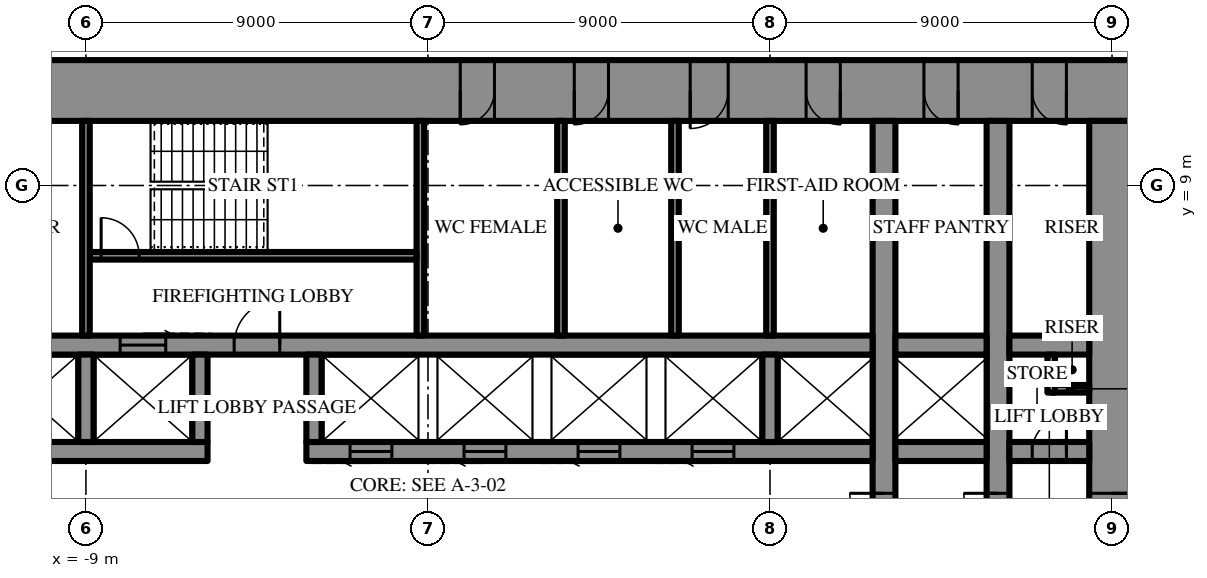
"""IFC4 building model, lengths in metres.
Left out: names, types, materials, properties, quantities, classifications, styles, units other than length and angle.
Written with IfcOpenShell. Run it as: python <this file> out.ifc"""

import sys

from ifc_helpers import new_model, si_unit, direction, frame, frame_2d, origin, place, context, subcontext, project, spatial, rectangle, extrude, element, fill, save


model = new_model("IFC4")
c1 = context("Model", 3, precision=1e-05, world=origin(), true_north=direction((0.0, 1.0)))
c2 = subcontext(c1, "Body", "Model", "MODEL_VIEW")
j1 = project(units=[si_unit("LENGTHUNIT", "METRE"), si_unit("PLANEANGLEUNIT", "RADIAN")], contexts=[c1])
p1 = place(None, origin())
s1 = spatial("IfcSite", under=j1, at=p1, CompositionType="ELEMENT")
p2 = place(p1, origin())
s2 = spatial("IfcBuilding", under=s1, at=p2, CompositionType="ELEMENT")
p3 = place(p2, frame((0.0, 0.0, 178.3)))
s3 = spatial("IfcBuildingStorey", under=s2, at=p3, CompositionType="ELEMENT", Elevation=178.3)
p4 = place(p3, frame((-18.6, 11.5, 0.0), z_axis=(0.0, 0.0, 1.0), x_axis=(1.0, 0.0, 0.0)))
e1 = element("IfcWall", 1, at=p4, inside=s3, PredefinedType="SHEAR", context=c2, shape_type="SweptSolid", body=[
    extrude(rectangle(XDim=37.2, YDim=1.6, at=frame_2d((18.6, 0.0))), origin(), (0.0, 0.0, 1.0), 4.2),
])
p5 = place(p4, frame((19.45, 0.0, 0.0)))
e2 = element("IfcOpeningElement", 2, at=p5, cuts=e1, PredefinedType="OPENING", context=c2, shape_type="SweptSolid", body=[
    extrude(rectangle(XDim=0.9, YDim=2.2, at=frame_2d((0.45, 1.1))), frame((0.0, 0.81, 0.0), z_axis=(0.0, -1.0, 0.0), x_axis=(1.0, 0.0, 0.0)), (0.0, 0.0, 1.0), 1.62),
])
p6 = place(p4, frame((22.45, 0.0, 0.0)))
e3 = element("IfcOpeningElement", 3, at=p6, cuts=e1, PredefinedType="OPENING", context=c2, shape_type="SweptSolid", body=[
    extrude(rectangle(XDim=0.9, YDim=2.2, at=frame_2d((0.45, 1.1))), frame((0.0, 0.81, 0.0), z_axis=(0.0, -1.0, 0.0), x_axis=(1.0, 0.0, 0.0)), (0.0, 0.0, 1.0), 1.62),
])
p7 = place(p4, frame((25.5, 0.0, 0.0)))
e4 = element("IfcOpeningElement", 4, at=p7, cuts=e1, PredefinedType="OPENING", context=c2, shape_type="SweptSolid", body=[
    extrude(rectangle(XDim=1.0, YDim=2.2, at=frame_2d((0.5, 1.1))), frame((0.0, 0.81, 0.0), z_axis=(0.0, -1.0, 0.0), x_axis=(1.0, 0.0, 0.0)), (0.0, 0.0, 1.0), 1.62),
])
p8 = place(p4, frame((1.8, 0.0, 0.0)))
e5 = element("IfcOpeningElement", 5, at=p8, cuts=e1, PredefinedType="OPENING", context=c2, shape_type="SweptSolid", body=[
    extrude(rectangle(XDim=0.9, YDim=2.2, at=frame_2d((0.45, 1.1))), frame((0.0, 0.81, 0.0), z_axis=(0.0, -1.0, 0.0), x_axis=(1.0, 0.0, 0.0)), (0.0, 0.0, 1.0), 1.62),
])
p9 = place(p4, frame((4.65, 0.0, 0.0)))
e6 = element("IfcOpeningElement", 6, at=p9, cuts=e1, PredefinedType="OPENING", context=c2, shape_type="SweptSolid", body=[
    extrude(rectangle(XDim=0.9, YDim=2.2, at=frame_2d((0.45, 1.1))), frame((0.0, 0.81, 0.0), z_axis=(0.0, -1.0, 0.0), x_axis=(1.0, 0.0, 0.0)), (0.0, 0.0, 1.0), 1.62),
])
p10 = place(p4, frame((7.75, 0.0, 0.0)))
e7 = element("IfcOpeningElement", 7, at=p10, cuts=e1, PredefinedType="OPENING", context=c2, shape_type="SweptSolid", body=[
    extrude(rectangle(XDim=0.9, YDim=2.2, at=frame_2d((0.45, 1.1))), frame((0.0, 0.81, 0.0), z_axis=(0.0, -1.0, 0.0), x_axis=(1.0, 0.0, 0.0)), (0.0, 0.0, 1.0), 1.62),
])
p11 = place(p4, frame((28.55, 0.0, 0.0)))
e8 = element("IfcOpeningElement", 8, at=p11, cuts=e1, PredefinedType="OPENING", context=c2, shape_type="SweptSolid", body=[
    extrude(rectangle(XDim=0.9, YDim=2.2, at=frame_2d((0.45, 1.1))), frame((0.0, 0.81, 0.0), z_axis=(0.0, -1.0, 0.0), x_axis=(1.0, 0.0, 0.0)), (0.0, 0.0, 1.0), 1.62),
])
p12 = place(p4, frame((31.65, 0.0, 0.0)))
e9 = element("IfcOpeningElement", 9, at=p12, cuts=e1, PredefinedType="OPENING", context=c2, shape_type="SweptSolid", body=[
    extrude(rectangle(XDim=0.9, YDim=2.2, at=frame_2d((0.45, 1.1))), frame((0.0, 0.81, 0.0), z_axis=(0.0, -1.0, 0.0), x_axis=(1.0, 0.0, 0.0)), (0.0, 0.0, 1.0), 1.62),
])
p13 = place(p4, frame((34.5, 0.0, 0.0)))
e10 = element("IfcOpeningElement", 10, at=p13, cuts=e1, PredefinedType="OPENING", context=c2, shape_type="SweptSolid", body=[
    extrude(rectangle(XDim=0.9, YDim=2.2, at=frame_2d((0.45, 1.1))), frame((0.0, 0.81, 0.0), z_axis=(0.0, -1.0, 0.0), x_axis=(1.0, 0.0, 0.0)), (0.0, 0.0, 1.0), 1.62),
])
p14 = place(p3, frame((18.0, -10.7, 0.0), z_axis=(0.0, 0.0, 1.0), x_axis=(0.0, 1.0, 0.0)))
e11 = element("IfcWall", 11, at=p14, inside=s3, PredefinedType="SHEAR", context=c2, shape_type="SweptSolid", body=[
    extrude(rectangle(XDim=21.4, YDim=1.2, at=frame_2d((10.7, 0.0))), origin(), (0.0, 0.0, 1.0), 4.2),
])
p15 = place(p14, frame((9.8, 0.0, 0.0)))
e12 = element("IfcOpeningElement", 12, at=p15, cuts=e11, PredefinedType="OPENING", context=c2, shape_type="SweptSolid", body=[
    extrude(rectangle(XDim=1.8, YDim=2.4, at=frame_2d((0.9, 1.2))), frame((0.0, 0.61, 0.0), z_axis=(0.0, -1.0, 0.0), x_axis=(1.0, 0.0, 0.0)), (0.0, 0.0, 1.0), 1.22),
])
p16 = place(p3, frame((12.0, -10.7, 0.0), z_axis=(0.0, 0.0, 1.0), x_axis=(0.0, 1.0, 0.0)))
e13 = element("IfcWall", 13, at=p16, inside=s3, PredefinedType="SHEAR", context=c2, shape_type="SweptSolid", body=[
    extrude(rectangle(XDim=21.4, YDim=0.6, at=frame_2d((10.7, 0.0))), origin(), (0.0, 0.0, 1.0), 4.2),
])
p17 = place(p16, frame((9.8, 0.0, 0.0)))
e14 = element("IfcOpeningElement", 14, at=p17, cuts=e13, PredefinedType="OPENING", context=c2, shape_type="SweptSolid", body=[
    extrude(rectangle(XDim=1.8, YDim=2.4, at=frame_2d((0.9, 1.2))), frame((0.0, 0.31, 0.0), z_axis=(0.0, -1.0, 0.0), x_axis=(1.0, 0.0, 0.0)), (0.0, 0.0, 1.0), 0.62),
])
p18 = place(p3, frame((15.0, -10.7, 0.0), z_axis=(0.0, 0.0, 1.0), x_axis=(0.0, 1.0, 0.0)))
e15 = element("IfcWall", 15, at=p18, inside=s3, PredefinedType="SHEAR", context=c2, shape_type="SweptSolid", body=[
    extrude(rectangle(XDim=21.4, YDim=0.6, at=frame_2d((10.7, 0.0))), origin(), (0.0, 0.0, 1.0), 4.2),
])
p19 = place(p18, frame((9.8, 0.0, 0.0)))
e16 = element("IfcOpeningElement", 16, at=p19, cuts=e15, PredefinedType="OPENING", context=c2, shape_type="SweptSolid", body=[
    extrude(rectangle(XDim=1.8, YDim=2.4, at=frame_2d((0.9, 1.2))), frame((0.0, 0.31, 0.0), z_axis=(0.0, -1.0, 0.0), x_axis=(1.0, 0.0, 0.0)), (0.0, 0.0, 1.0), 0.62),
])
p20 = place(p3, frame((-11.7, 2.0, 0.0), z_axis=(0.0, 0.0, 1.0), x_axis=(1.0, 0.0, 0.0)))
e17 = element("IfcWall", 17, at=p20, inside=s3, PredefinedType="SHEAR", context=c2, shape_type="SweptSolid", body=[
    extrude(rectangle(XDim=5.9, YDim=0.5, at=frame_2d((2.95, 0.0))), origin(), (0.0, 0.0, 1.0), 4.2),
])
p21 = place(p3, frame((-3.2, 2.0, 0.0), z_axis=(0.0, 0.0, 1.0), x_axis=(1.0, 0.0, 0.0)))
e18 = element("IfcWall", 18, at=p21, inside=s3, PredefinedType="SHEAR", context=c2, shape_type="SweptSolid", body=[
    extrude(rectangle(XDim=14.9, YDim=0.5, at=frame_2d((7.45, 0.0))), origin(), (0.0, 0.0, 1.0), 4.2),
])
p22 = place(p21, frame((1.15, 0.0, 0.0)))
e19 = element("IfcOpeningElement", 19, at=p22, cuts=e18, PredefinedType="OPENING", context=c2, shape_type="SweptSolid", body=[
    extrude(rectangle(XDim=1.1, YDim=2.2, at=frame_2d((0.55, 1.1))), frame((0.0, 0.26, 0.0), z_axis=(0.0, -1.0, 0.0), x_axis=(1.0, 0.0, 0.0)), (0.0, 0.0, 1.0), 0.52),
])
p23 = place(p21, frame((4.15, 0.0, 0.0)))
e20 = element("IfcOpeningElement", 20, at=p23, cuts=e18, PredefinedType="OPENING", context=c2, shape_type="SweptSolid", body=[
    extrude(rectangle(XDim=1.1, YDim=2.2, at=frame_2d((0.55, 1.1))), frame((0.0, 0.26, 0.0), z_axis=(0.0, -1.0, 0.0), x_axis=(1.0, 0.0, 0.0)), (0.0, 0.0, 1.0), 0.52),
])
p24 = place(p21, frame((7.15, 0.0, 0.0)))
e21 = element("IfcOpeningElement", 21, at=p24, cuts=e18, PredefinedType="OPENING", context=c2, shape_type="SweptSolid", body=[
    extrude(rectangle(XDim=1.1, YDim=2.2, at=frame_2d((0.55, 1.1))), frame((0.0, 0.26, 0.0), z_axis=(0.0, -1.0, 0.0), x_axis=(1.0, 0.0, 0.0)), (0.0, 0.0, 1.0), 0.52),
])
p25 = place(p21, frame((10.15, 0.0, 0.0)))
e22 = element("IfcOpeningElement", 22, at=p25, cuts=e18, PredefinedType="OPENING", context=c2, shape_type="SweptSolid", body=[
    extrude(rectangle(XDim=1.1, YDim=2.2, at=frame_2d((0.55, 1.1))), frame((0.0, 0.26, 0.0), z_axis=(0.0, -1.0, 0.0), x_axis=(1.0, 0.0, 0.0)), (0.0, 0.0, 1.0), 0.52),
])
p26 = place(p3, frame((12.3, 2.0, 0.0), z_axis=(0.0, 0.0, 1.0), x_axis=(1.0, 0.0, 0.0)))
e23 = element("IfcWall", 23, at=p26, inside=s3, PredefinedType="SHEAR", context=c2, shape_type="SweptSolid", body=[
    extrude(rectangle(XDim=2.4, YDim=0.5, at=frame_2d((1.2, 0.0))), origin(), (0.0, 0.0, 1.0), 4.2),
])
p27 = place(p3, frame((15.3, 2.0, 0.0), z_axis=(0.0, 0.0, 1.0), x_axis=(1.0, 0.0, 0.0)))
e24 = element("IfcWall", 24, at=p27, inside=s3, PredefinedType="SHEAR", context=c2, shape_type="SweptSolid", body=[
    extrude(rectangle(XDim=2.1, YDim=0.5, at=frame_2d((1.05, 0.0))), origin(), (0.0, 0.0, 1.0), 4.2),
])
p28 = place(p27, frame((0.6, 0.0, 0.0)))
e25 = element("IfcOpeningElement", 25, at=p28, cuts=e24, PredefinedType="OPENING", context=c2, shape_type="SweptSolid", body=[
    extrude(rectangle(XDim=0.9, YDim=2.2, at=frame_2d((0.45, 1.1))), frame((0.0, 0.26, 0.0), z_axis=(0.0, -1.0, 0.0), x_axis=(1.0, 0.0, 0.0)), (0.0, 0.0, 1.0), 0.52),
])
p29 = place(p3, frame((-11.7, 4.8, 0.0), z_axis=(0.0, 0.0, 1.0), x_axis=(1.0, 0.0, 0.0)))
e26 = element("IfcWall", 26, at=p29, inside=s3, PredefinedType="SHEAR", context=c2, shape_type="SweptSolid", body=[
    extrude(rectangle(XDim=23.4, YDim=0.5, at=frame_2d((11.7, 0.0))), origin(), (0.0, 0.0, 1.0), 4.2),
])
p30 = place(p29, frame((6.6, 0.0, 0.0)))
e27 = element("IfcOpeningElement", 27, at=p30, cuts=e26, PredefinedType="OPENING", context=c2, shape_type="SweptSolid", body=[
    extrude(rectangle(XDim=1.2, YDim=2.2, at=frame_2d((0.6, 1.1))), frame((0.0, 0.26, 0.0), z_axis=(0.0, -1.0, 0.0), x_axis=(1.0, 0.0, 0.0)), (0.0, 0.0, 1.0), 0.52),
])
p31 = place(p29, frame((3.6, 0.0, 0.0)))
e28 = element("IfcOpeningElement", 28, at=p31, cuts=e26, PredefinedType="OPENING", context=c2, shape_type="SweptSolid", body=[
    extrude(rectangle(XDim=1.2, YDim=2.2, at=frame_2d((0.6, 1.1))), frame((0.0, 0.26, 0.0), z_axis=(0.0, -1.0, 0.0), x_axis=(1.0, 0.0, 0.0)), (0.0, 0.0, 1.0), 0.52),
])
p32 = place(p3, frame((12.3, 4.8, 0.0), z_axis=(0.0, 0.0, 1.0), x_axis=(1.0, 0.0, 0.0)))
e29 = element("IfcWall", 29, at=p32, inside=s3, PredefinedType="SHEAR", context=c2, shape_type="SweptSolid", body=[
    extrude(rectangle(XDim=2.4, YDim=0.5, at=frame_2d((1.2, 0.0))), origin(), (0.0, 0.0, 1.0), 4.2),
])
p33 = place(p3, frame((15.3, 4.8, 0.0), z_axis=(0.0, 0.0, 1.0), x_axis=(1.0, 0.0, 0.0)))
e30 = element("IfcWall", 30, at=p33, inside=s3, PredefinedType="SHEAR", context=c2, shape_type="SweptSolid", body=[
    extrude(rectangle(XDim=2.1, YDim=0.5, at=frame_2d((1.05, 0.0))), origin(), (0.0, 0.0, 1.0), 4.2),
])
for number, where, z_axis, x_axis in (
    (31, (-9.0, 2.25, 0.0), (0.0, 0.0, 1.0), (0.0, 1.0, 0.0)),
    (32, (-6.0, 2.25, 0.0), (0.0, 0.0, 1.0), (0.0, 1.0, 0.0)),
    (33, (-3.0, 2.25, 0.0), (0.0, 0.0, 1.0), (0.0, 1.0, 0.0)),
    (34, (9.0, 2.25, 0.0), (0.0, 0.0, 1.0), (0.0, 1.0, 0.0)),
):
    element("IfcWall", number, at=place(p3, frame(where, z_axis=z_axis, x_axis=x_axis)), inside=s3, PredefinedType="SHEAR", context=c2, shape_type="SweptSolid", body=[
        extrude(rectangle(XDim=2.3, YDim=0.4, at=frame_2d((1.15, 0.0))), origin(), (0.0, 0.0, 1.0), 4.2),
    ])
p34 = place(p3, frame((-0.2, 5.05, 0.0), z_axis=(0.0, 0.0, 1.0), x_axis=(0.0, 1.0, 0.0)))
e35 = element("IfcWall", 35, at=p34, inside=s3, PredefinedType="SHEAR", context=c2, shape_type="SweptSolid", body=[
    extrude(rectangle(XDim=5.65, YDim=0.2, at=frame_2d((2.825, 0.0))), origin(), (0.0, 0.0, 1.0), 4.2),
])
p35 = place(p3, frame((-8.9, 7.15, 0.0), z_axis=(0.0, 0.0, 1.0), x_axis=(1.0, 0.0, 0.0)))
e36 = element("IfcWall", 36, at=p35, inside=s3, PredefinedType="SHEAR", context=c2, shape_type="SweptSolid", body=[
    extrude(rectangle(XDim=8.6, YDim=0.2, at=frame_2d((4.3, 0.0))), origin(), (0.0, 0.0, 1.0), 4.2),
])
p36 = place(p35, frame((0.3, 0.0, 0.0)))
e37 = element("IfcOpeningElement", 37, at=p36, cuts=e36, PredefinedType="OPENING", context=c2, shape_type="SweptSolid", body=[
    extrude(rectangle(XDim=1.0, YDim=2.2, at=frame_2d((0.5, 1.1))), frame((0.0, 0.11, 0.0), z_axis=(0.0, -1.0, 0.0), x_axis=(1.0, 0.0, 0.0)), (0.0, 0.0, 1.0), 0.22),
])
for number, where, z_axis, x_axis in (
    (38, (-9.0, 5.05, 0.0), (0.0, 0.0, 1.0), (0.0, 1.0, 0.0)),
    (39, (9.0, 5.05, 0.0), (0.0, 0.0, 1.0), (0.0, 1.0, 0.0)),
    (40, (3.5, 5.05, 0.0), (0.0, 0.0, 1.0), (0.0, 1.0, 0.0)),
    (41, (6.5, 5.05, 0.0), (0.0, 0.0, 1.0), (0.0, 1.0, 0.0)),
):
    element("IfcWall", number, at=place(p3, frame(where, z_axis=z_axis, x_axis=x_axis)), inside=s3, PredefinedType="PARTITIONING", context=c2, shape_type="SweptSolid", body=[
        extrude(rectangle(XDim=5.65, YDim=0.2, at=frame_2d((2.825, 0.0))), origin(), (0.0, 0.0, 1.0), 4.0),
    ])
for number, where, z_axis, x_axis in (
    (42, (16.4, 3.65, 0.0), (0.0, 0.0, 1.0), (1.0, 0.0, 0.0)),
    (43, (16.4, 3.55, 0.0), (0.0, 0.0, 1.0), (0.0, 1.0, 0.0)),
):
    element("IfcWall", number, at=place(p3, frame(where, z_axis=z_axis, x_axis=x_axis)), inside=s3, PredefinedType="PARTITIONING", context=c2, shape_type="SweptSolid", body=[
        extrude(rectangle(XDim=1.0, YDim=0.2, at=frame_2d((0.5, 0.0))), origin(), (0.0, 0.0, 1.0), 4.0),
    ])
p37 = place(p15, frame((1.8, 0.0, 0.0), z_axis=(0.0, 0.0, 1.0), x_axis=(-1.0, 0.0, 0.0)))
e44 = element("IfcDoor", 44, at=p37, inside=s3, OperationType="DOUBLE_DOOR_SINGLE_SWING", PredefinedType="DOOR", context=c2, shape_type="SweptSolid", body=[
    extrude(rectangle(XDim=1.8, YDim=2.4, at=frame_2d((0.9, 1.2))), frame((0.0, 0.025, 0.0), z_axis=(0.0, -1.0, 0.0), x_axis=(1.0, 0.0, 0.0)), (0.0, 0.0, 1.0), 0.05),
])
fill(e12, e44)
p38 = place(p30, origin())
e45 = element("IfcDoor", 45, at=p38, inside=s3, OperationType="SINGLE_SWING_LEFT", PredefinedType="DOOR", context=c2, shape_type="SweptSolid", body=[
    extrude(rectangle(XDim=1.2, YDim=2.2, at=frame_2d((0.6, 1.1))), frame((0.0, 0.025, 0.0), z_axis=(0.0, -1.0, 0.0), x_axis=(1.0, 0.0, 0.0)), (0.0, 0.0, 1.0), 0.05),
])
fill(e27, e45)
p39 = place(p36, origin())
e46 = element("IfcDoor", 46, at=p39, inside=s3, OperationType="SINGLE_SWING_RIGHT", PredefinedType="DOOR", context=c2, shape_type="SweptSolid", body=[
    extrude(rectangle(XDim=1.0, YDim=2.2, at=frame_2d((0.5, 1.1))), frame((0.0, 0.025, 0.0), z_axis=(0.0, -1.0, 0.0), x_axis=(1.0, 0.0, 0.0)), (0.0, 0.0, 1.0), 0.05),
])
fill(e37, e46)
p40 = place(p5, frame((0.9, 0.0, 0.0), z_axis=(0.0, 0.0, 1.0), x_axis=(-1.0, 0.0, 0.0)))
e47 = element("IfcDoor", 47, at=p40, inside=s3, OperationType="SINGLE_SWING_LEFT", PredefinedType="DOOR", context=c2, shape_type="SweptSolid", body=[
    extrude(rectangle(XDim=0.9, YDim=2.2, at=frame_2d((0.45, 1.1))), frame((0.0, 0.025, 0.0), z_axis=(0.0, -1.0, 0.0), x_axis=(1.0, 0.0, 0.0)), (0.0, 0.0, 1.0), 0.05),
])
fill(e2, e47)
p41 = place(p6, frame((0.9, 0.0, 0.0), z_axis=(0.0, 0.0, 1.0), x_axis=(-1.0, 0.0, 0.0)))
e48 = element("IfcDoor", 48, at=p41, inside=s3, OperationType="SINGLE_SWING_LEFT", PredefinedType="DOOR", context=c2, shape_type="SweptSolid", body=[
    extrude(rectangle(XDim=0.9, YDim=2.2, at=frame_2d((0.45, 1.1))), frame((0.0, 0.025, 0.0), z_axis=(0.0, -1.0, 0.0), x_axis=(1.0, 0.0, 0.0)), (0.0, 0.0, 1.0), 0.05),
])
fill(e3, e48)
p42 = place(p7, frame((1.0, 0.0, 0.0), z_axis=(0.0, 0.0, 1.0), x_axis=(-1.0, 0.0, 0.0)))
e49 = element("IfcDoor", 49, at=p42, inside=s3, OperationType="SINGLE_SWING_LEFT", PredefinedType="DOOR", context=c2, shape_type="SweptSolid", body=[
    extrude(rectangle(XDim=1.0, YDim=2.2, at=frame_2d((0.5, 1.1))), frame((0.0, 0.025, 0.0), z_axis=(0.0, -1.0, 0.0), x_axis=(1.0, 0.0, 0.0)), (0.0, 0.0, 1.0), 0.05),
])
fill(e4, e49)
p43 = place(p11, frame((0.9, 0.0, 0.0), z_axis=(0.0, 0.0, 1.0), x_axis=(-1.0, 0.0, 0.0)))
e50 = element("IfcDoor", 50, at=p43, inside=s3, OperationType="SINGLE_SWING_RIGHT", PredefinedType="DOOR", context=c2, shape_type="SweptSolid", body=[
    extrude(rectangle(XDim=0.9, YDim=2.2, at=frame_2d((0.45, 1.1))), frame((0.0, 0.025, 0.0), z_axis=(0.0, -1.0, 0.0), x_axis=(1.0, 0.0, 0.0)), (0.0, 0.0, 1.0), 0.05),
])
fill(e8, e50)
p44 = place(p12, frame((0.9, 0.0, 0.0), z_axis=(0.0, 0.0, 1.0), x_axis=(-1.0, 0.0, 0.0)))
e51 = element("IfcDoor", 51, at=p44, inside=s3, OperationType="SINGLE_SWING_RIGHT", PredefinedType="DOOR", context=c2, shape_type="SweptSolid", body=[
    extrude(rectangle(XDim=0.9, YDim=2.2, at=frame_2d((0.45, 1.1))), frame((0.0, 0.025, 0.0), z_axis=(0.0, -1.0, 0.0), x_axis=(1.0, 0.0, 0.0)), (0.0, 0.0, 1.0), 0.05),
])
fill(e9, e51)
p45 = place(p13, frame((0.9, 0.0, 0.0), z_axis=(0.0, 0.0, 1.0), x_axis=(-1.0, 0.0, 0.0)))
e52 = element("IfcDoor", 52, at=p45, inside=s3, OperationType="SINGLE_SWING_RIGHT", PredefinedType="DOOR", context=c2, shape_type="SweptSolid", body=[
    extrude(rectangle(XDim=0.9, YDim=2.2, at=frame_2d((0.45, 1.1))), frame((0.0, 0.025, 0.0), z_axis=(0.0, -1.0, 0.0), x_axis=(1.0, 0.0, 0.0)), (0.0, 0.0, 1.0), 0.05),
])
fill(e10, e52)
p46 = place(p28, origin())
e53 = element("IfcDoor", 53, at=p46, inside=s3, OperationType="SINGLE_SWING_LEFT", PredefinedType="DOOR", context=c2, shape_type="SweptSolid", body=[
    extrude(rectangle(XDim=0.9, YDim=2.2, at=frame_2d((0.45, 1.1))), frame((0.0, 0.025, 0.0), z_axis=(0.0, -1.0, 0.0), x_axis=(1.0, 0.0, 0.0)), (0.0, 0.0, 1.0), 0.05),
])
fill(e25, e53)
p47 = place(p17, origin())
e54 = element("IfcDoor", 54, at=p47, inside=s3, OperationType="DOUBLE_DOOR_SINGLE_SWING", PredefinedType="DOOR", context=c2, shape_type="SweptSolid", body=[
    extrude(rectangle(XDim=1.8, YDim=2.4, at=frame_2d((0.9, 1.2))), frame((0.0, 0.025, 0.0), z_axis=(0.0, -1.0, 0.0), x_axis=(1.0, 0.0, 0.0)), (0.0, 0.0, 1.0), 0.05),
])
fill(e14, e54)
p48 = place(p19, origin())
e55 = element("IfcDoor", 55, at=p48, inside=s3, OperationType="DOUBLE_DOOR_SINGLE_SWING", PredefinedType="DOOR", context=c2, shape_type="SweptSolid", body=[
    extrude(rectangle(XDim=1.8, YDim=2.4, at=frame_2d((0.9, 1.2))), frame((0.0, 0.025, 0.0), z_axis=(0.0, -1.0, 0.0), x_axis=(1.0, 0.0, 0.0)), (0.0, 0.0, 1.0), 0.05),
])
fill(e16, e55)
p49 = place(p31, origin())
e56 = element("IfcDoor", 56, at=p49, inside=s3, OperationType="SLIDING_TO_LEFT", PredefinedType="DOOR", context=c2, shape_type="SweptSolid", body=[
    extrude(rectangle(XDim=1.2, YDim=2.2, at=frame_2d((0.6, 1.1))), frame((0.0, 0.025, 0.0), z_axis=(0.0, -1.0, 0.0), x_axis=(1.0, 0.0, 0.0)), (0.0, 0.0, 1.0), 0.05),
])
fill(e28, e56)
p50 = place(p22, frame((1.1, 0.0, 0.0), z_axis=(0.0, 0.0, 1.0), x_axis=(-1.0, 0.0, 0.0)))
e57 = element("IfcDoor", 57, at=p50, inside=s3, OperationType="SLIDING_TO_LEFT", PredefinedType="DOOR", context=c2, shape_type="SweptSolid", body=[
    extrude(rectangle(XDim=1.1, YDim=2.2, at=frame_2d((0.55, 1.1))), frame((0.0, 0.025, 0.0), z_axis=(0.0, -1.0, 0.0), x_axis=(1.0, 0.0, 0.0)), (0.0, 0.0, 1.0), 0.05),
])
fill(e19, e57)
p51 = place(p23, frame((1.1, 0.0, 0.0), z_axis=(0.0, 0.0, 1.0), x_axis=(-1.0, 0.0, 0.0)))
e58 = element("IfcDoor", 58, at=p51, inside=s3, OperationType="SLIDING_TO_LEFT", PredefinedType="DOOR", context=c2, shape_type="SweptSolid", body=[
    extrude(rectangle(XDim=1.1, YDim=2.2, at=frame_2d((0.55, 1.1))), frame((0.0, 0.025, 0.0), z_axis=(0.0, -1.0, 0.0), x_axis=(1.0, 0.0, 0.0)), (0.0, 0.0, 1.0), 0.05),
])
fill(e20, e58)
p52 = place(p24, frame((1.1, 0.0, 0.0), z_axis=(0.0, 0.0, 1.0), x_axis=(-1.0, 0.0, 0.0)))
e59 = element("IfcDoor", 59, at=p52, inside=s3, OperationType="SLIDING_TO_LEFT", PredefinedType="DOOR", context=c2, shape_type="SweptSolid", body=[
    extrude(rectangle(XDim=1.1, YDim=2.2, at=frame_2d((0.55, 1.1))), frame((0.0, 0.025, 0.0), z_axis=(0.0, -1.0, 0.0), x_axis=(1.0, 0.0, 0.0)), (0.0, 0.0, 1.0), 0.05),
])
fill(e21, e59)
p53 = place(p25, frame((1.1, 0.0, 0.0), z_axis=(0.0, 0.0, 1.0), x_axis=(-1.0, 0.0, 0.0)))
e60 = element("IfcDoor", 60, at=p53, inside=s3, OperationType="SLIDING_TO_LEFT", PredefinedType="DOOR", context=c2, shape_type="SweptSolid", body=[
    extrude(rectangle(XDim=1.1, YDim=2.2, at=frame_2d((0.55, 1.1))), frame((0.0, 0.025, 0.0), z_axis=(0.0, -1.0, 0.0), x_axis=(1.0, 0.0, 0.0)), (0.0, 0.0, 1.0), 0.05),
])
fill(e22, e60)
save(model, sys.argv[1])
